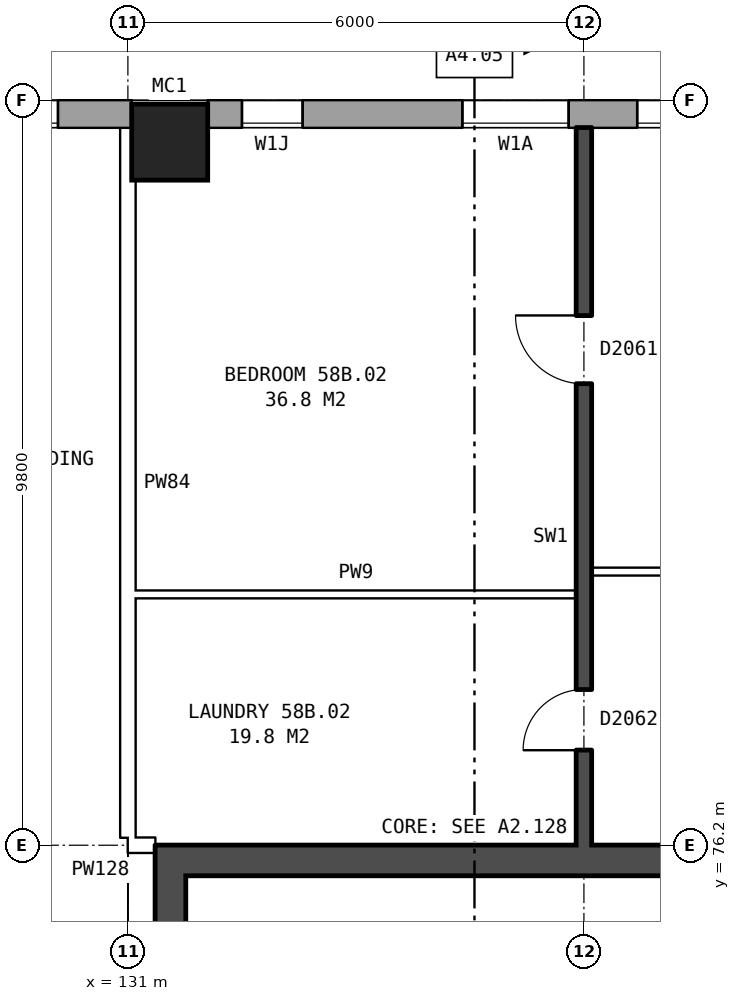
"""IFC4 building model, lengths in metres.
Left out: names, types, materials, properties, quantities, classifications, styles, units other than length and angle.
Written with IfcOpenShell. Run it as: python <this file> out.ifc"""

import sys

from ifc_helpers import new_model, si_unit, direction, frame, frame_2d, origin, origin_2d, place, context, subcontext, project, spatial, rectangle, hollow_rectangle, extrude, element, fill, save


model = new_model("IFC4")
c1 = context("Model", 3, precision=1e-05, world=origin(), true_north=direction((0.0, 1.0)))
c2 = subcontext(c1, "Body", "Model", "MODEL_VIEW")
j1 = project(units=[si_unit("LENGTHUNIT", "METRE"), si_unit("PLANEANGLEUNIT", "RADIAN")], contexts=[c1])
p1 = place(None, origin())
s1 = spatial("IfcSite", under=j1, at=p1, CompositionType="ELEMENT")
p2 = place(p1, origin())
s2 = spatial("IfcBuilding", under=s1, at=p2, CompositionType="ELEMENT")
p3 = place(p2, frame((0.0, 0.0, 205.9)))
s3 = spatial("IfcBuildingStorey", under=s2, at=p3, CompositionType="ELEMENT", Elevation=205.9)
p4 = place(p3, frame((131.55, 85.45, 0.0), z_axis=(0.0, 0.0, 1.0), x_axis=(1.0, 0.0, 0.0)))
e1 = element("IfcColumn", 1, at=p4, inside=s3, PredefinedType="COLUMN", context=c2, shape_type="SweptSolid", body=[
    extrude(hollow_rectangle(XDim=1.0, YDim=1.0, WallThickness=0.055, at=origin_2d()), origin(), (0.0, 0.0, 1.0), 3.1),
])
p5 = place(p3, frame((165.925, 85.82, 0.0), z_axis=(0.0, 0.0, 1.0), x_axis=(-1.0, 0.0, 0.0)))
e2 = element("IfcWall", 2, at=p5, inside=s3, PredefinedType="STANDARD", context=c2, shape_type="SweptSolid", body=[
    extrude(rectangle(XDim=33.875, YDim=0.36, at=frame_2d((16.938, 0.0))), origin(), (0.0, 0.0, 1.0), 2.85),
])
p6 = place(p5, frame((2.625, 0.0, 0.8)))
e3 = element("IfcOpeningElement", 3, at=p6, cuts=e2, PredefinedType="OPENING", context=c2, shape_type="SweptSolid", body=[
    extrude(rectangle(XDim=1.6, YDim=1.8, at=frame_2d((0.8, 0.9))), frame((0.0, 0.19, 0.0), z_axis=(0.0, -1.0, 0.0), x_axis=(1.0, 0.0, 0.0)), (0.0, 0.0, 1.0), 0.38),
])
p7 = place(p5, frame((5.625, 0.0, 0.8)))
e4 = element("IfcOpeningElement", 4, at=p7, cuts=e2, PredefinedType="OPENING", context=c2, shape_type="SweptSolid", body=[
    extrude(rectangle(XDim=1.6, YDim=1.8, at=frame_2d((0.8, 0.9))), frame((0.0, 0.19, 0.0), z_axis=(0.0, -1.0, 0.0), x_axis=(1.0, 0.0, 0.0)), (0.0, 0.0, 1.0), 0.38),
])
p8 = place(p5, frame((8.625, 0.0, 0.8)))
e5 = element("IfcOpeningElement", 5, at=p8, cuts=e2, PredefinedType="OPENING", context=c2, shape_type="SweptSolid", body=[
    extrude(rectangle(XDim=1.6, YDim=1.8, at=frame_2d((0.8, 0.9))), frame((0.0, 0.19, 0.0), z_axis=(0.0, -1.0, 0.0), x_axis=(1.0, 0.0, 0.0)), (0.0, 0.0, 1.0), 0.38),
])
p9 = place(p5, frame((11.625, 0.0, 0.8)))
e6 = element("IfcOpeningElement", 6, at=p9, cuts=e2, PredefinedType="OPENING", context=c2, shape_type="SweptSolid", body=[
    extrude(rectangle(XDim=1.6, YDim=1.8, at=frame_2d((0.8, 0.9))), frame((0.0, 0.19, 0.0), z_axis=(0.0, -1.0, 0.0), x_axis=(1.0, 0.0, 0.0)), (0.0, 0.0, 1.0), 0.38),
])
p10 = place(p5, frame((14.625, 0.0, 0.8)))
e7 = element("IfcOpeningElement", 7, at=p10, cuts=e2, PredefinedType="OPENING", context=c2, shape_type="SweptSolid", body=[
    extrude(rectangle(XDim=1.6, YDim=1.8, at=frame_2d((0.8, 0.9))), frame((0.0, 0.19, 0.0), z_axis=(0.0, -1.0, 0.0), x_axis=(1.0, 0.0, 0.0)), (0.0, 0.0, 1.0), 0.38),
])
p11 = place(p5, frame((17.625, 0.0, 0.8)))
e8 = element("IfcOpeningElement", 8, at=p11, cuts=e2, PredefinedType="OPENING", context=c2, shape_type="SweptSolid", body=[
    extrude(rectangle(XDim=1.6, YDim=1.8, at=frame_2d((0.8, 0.9))), frame((0.0, 0.19, 0.0), z_axis=(0.0, -1.0, 0.0), x_axis=(1.0, 0.0, 0.0)), (0.0, 0.0, 1.0), 0.38),
])
p12 = place(p5, frame((20.625, 0.0, 0.8)))
e9 = element("IfcOpeningElement", 9, at=p12, cuts=e2, PredefinedType="OPENING", context=c2, shape_type="SweptSolid", body=[
    extrude(rectangle(XDim=1.6, YDim=1.8, at=frame_2d((0.8, 0.9))), frame((0.0, 0.19, 0.0), z_axis=(0.0, -1.0, 0.0), x_axis=(1.0, 0.0, 0.0)), (0.0, 0.0, 1.0), 0.38),
])
p13 = place(p5, frame((23.625, 0.0, 0.8)))
e10 = element("IfcOpeningElement", 10, at=p13, cuts=e2, PredefinedType="OPENING", context=c2, shape_type="SweptSolid", body=[
    extrude(rectangle(XDim=1.6, YDim=1.8, at=frame_2d((0.8, 0.9))), frame((0.0, 0.19, 0.0), z_axis=(0.0, -1.0, 0.0), x_axis=(1.0, 0.0, 0.0)), (0.0, 0.0, 1.0), 0.38),
])
p14 = place(p5, frame((26.625, 0.0, 0.8)))
e11 = element("IfcOpeningElement", 11, at=p14, cuts=e2, PredefinedType="OPENING", context=c2, shape_type="SweptSolid", body=[
    extrude(rectangle(XDim=1.6, YDim=1.8, at=frame_2d((0.8, 0.9))), frame((0.0, 0.19, 0.0), z_axis=(0.0, -1.0, 0.0), x_axis=(1.0, 0.0, 0.0)), (0.0, 0.0, 1.0), 0.38),
])
p15 = place(p5, frame((29.125, 0.0, 0.8)))
e12 = element("IfcOpeningElement", 12, at=p15, cuts=e2, PredefinedType="OPENING", context=c2, shape_type="SweptSolid", body=[
    extrude(rectangle(XDim=1.4, YDim=1.8, at=frame_2d((0.7, 0.9))), frame((0.0, 0.19, 0.0), z_axis=(0.0, -1.0, 0.0), x_axis=(1.0, 0.0, 0.0)), (0.0, 0.0, 1.0), 0.38),
])
p16 = place(p5, frame((32.625, 0.0, 1.1)))
e13 = element("IfcOpeningElement", 13, at=p16, cuts=e2, PredefinedType="OPENING", context=c2, shape_type="SweptSolid", body=[
    extrude(rectangle(XDim=0.8, YDim=1.5, at=frame_2d((0.4, 0.75))), frame((0.0, 0.19, 0.0), z_axis=(0.0, -1.0, 0.0), x_axis=(1.0, 0.0, 0.0)), (0.0, 0.0, 1.0), 0.38),
])
p17 = place(p3, frame((131.05, 85.82, 0.0), z_axis=(0.0, 0.0, 1.0), x_axis=(-1.0, 0.0, 0.0)))
e14 = element("IfcWall", 14, at=p17, inside=s3, PredefinedType="STANDARD", context=c2, shape_type="SweptSolid", body=[
    extrude(rectangle(XDim=55.1, YDim=0.36, at=frame_2d((27.55, 0.0))), origin(), (0.0, 0.0, 1.0), 2.85),
])
p18 = place(p17, frame((0.969, 0.0, 0.8)))
e15 = element("IfcOpeningElement", 15, at=p18, cuts=e14, PredefinedType="OPENING", context=c2, shape_type="SweptSolid", body=[
    extrude(rectangle(XDim=1.6, YDim=1.8, at=frame_2d((0.8, 0.9))), frame((0.0, 0.19, 0.0), z_axis=(0.0, -1.0, 0.0), x_axis=(1.0, 0.0, 0.0)), (0.0, 0.0, 1.0), 0.38),
])
p19 = place(p17, frame((4.406, 0.0, 0.8)))
e16 = element("IfcOpeningElement", 16, at=p19, cuts=e14, PredefinedType="OPENING", context=c2, shape_type="SweptSolid", body=[
    extrude(rectangle(XDim=1.6, YDim=1.8, at=frame_2d((0.8, 0.9))), frame((0.0, 0.19, 0.0), z_axis=(0.0, -1.0, 0.0), x_axis=(1.0, 0.0, 0.0)), (0.0, 0.0, 1.0), 0.38),
])
p20 = place(p17, frame((7.844, 0.0, 0.8)))
e17 = element("IfcOpeningElement", 17, at=p20, cuts=e14, PredefinedType="OPENING", context=c2, shape_type="SweptSolid", body=[
    extrude(rectangle(XDim=1.6, YDim=1.8, at=frame_2d((0.8, 0.9))), frame((0.0, 0.19, 0.0), z_axis=(0.0, -1.0, 0.0), x_axis=(1.0, 0.0, 0.0)), (0.0, 0.0, 1.0), 0.38),
])
p21 = place(p17, frame((11.281, 0.0, 0.8)))
e18 = element("IfcOpeningElement", 18, at=p21, cuts=e14, PredefinedType="OPENING", context=c2, shape_type="SweptSolid", body=[
    extrude(rectangle(XDim=1.6, YDim=1.8, at=frame_2d((0.8, 0.9))), frame((0.0, 0.19, 0.0), z_axis=(0.0, -1.0, 0.0), x_axis=(1.0, 0.0, 0.0)), (0.0, 0.0, 1.0), 0.38),
])
p22 = place(p17, frame((14.719, 0.0, 0.8)))
e19 = element("IfcOpeningElement", 19, at=p22, cuts=e14, PredefinedType="OPENING", context=c2, shape_type="SweptSolid", body=[
    extrude(rectangle(XDim=1.6, YDim=1.8, at=frame_2d((0.8, 0.9))), frame((0.0, 0.19, 0.0), z_axis=(0.0, -1.0, 0.0), x_axis=(1.0, 0.0, 0.0)), (0.0, 0.0, 1.0), 0.38),
])
p23 = place(p17, frame((18.156, 0.0, 0.8)))
e20 = element("IfcOpeningElement", 20, at=p23, cuts=e14, PredefinedType="OPENING", context=c2, shape_type="SweptSolid", body=[
    extrude(rectangle(XDim=1.6, YDim=1.8, at=frame_2d((0.8, 0.9))), frame((0.0, 0.19, 0.0), z_axis=(0.0, -1.0, 0.0), x_axis=(1.0, 0.0, 0.0)), (0.0, 0.0, 1.0), 0.38),
])
p24 = place(p17, frame((21.594, 0.0, 0.8)))
e21 = element("IfcOpeningElement", 21, at=p24, cuts=e14, PredefinedType="OPENING", context=c2, shape_type="SweptSolid", body=[
    extrude(rectangle(XDim=1.6, YDim=1.8, at=frame_2d((0.8, 0.9))), frame((0.0, 0.19, 0.0), z_axis=(0.0, -1.0, 0.0), x_axis=(1.0, 0.0, 0.0)), (0.0, 0.0, 1.0), 0.38),
])
p25 = place(p17, frame((25.031, 0.0, 0.8)))
e22 = element("IfcOpeningElement", 22, at=p25, cuts=e14, PredefinedType="OPENING", context=c2, shape_type="SweptSolid", body=[
    extrude(rectangle(XDim=1.6, YDim=1.8, at=frame_2d((0.8, 0.9))), frame((0.0, 0.19, 0.0), z_axis=(0.0, -1.0, 0.0), x_axis=(1.0, 0.0, 0.0)), (0.0, 0.0, 1.0), 0.38),
])
p26 = place(p17, frame((28.469, 0.0, 0.8)))
e23 = element("IfcOpeningElement", 23, at=p26, cuts=e14, PredefinedType="OPENING", context=c2, shape_type="SweptSolid", body=[
    extrude(rectangle(XDim=1.6, YDim=1.8, at=frame_2d((0.8, 0.9))), frame((0.0, 0.19, 0.0), z_axis=(0.0, -1.0, 0.0), x_axis=(1.0, 0.0, 0.0)), (0.0, 0.0, 1.0), 0.38),
])
p27 = place(p17, frame((31.906, 0.0, 0.8)))
e24 = element("IfcOpeningElement", 24, at=p27, cuts=e14, PredefinedType="OPENING", context=c2, shape_type="SweptSolid", body=[
    extrude(rectangle(XDim=1.6, YDim=1.8, at=frame_2d((0.8, 0.9))), frame((0.0, 0.19, 0.0), z_axis=(0.0, -1.0, 0.0), x_axis=(1.0, 0.0, 0.0)), (0.0, 0.0, 1.0), 0.38),
])
p28 = place(p17, frame((35.344, 0.0, 0.8)))
e25 = element("IfcOpeningElement", 25, at=p28, cuts=e14, PredefinedType="OPENING", context=c2, shape_type="SweptSolid", body=[
    extrude(rectangle(XDim=1.6, YDim=1.8, at=frame_2d((0.8, 0.9))), frame((0.0, 0.19, 0.0), z_axis=(0.0, -1.0, 0.0), x_axis=(1.0, 0.0, 0.0)), (0.0, 0.0, 1.0), 0.38),
])
p29 = place(p17, frame((38.781, 0.0, 0.8)))
e26 = element("IfcOpeningElement", 26, at=p29, cuts=e14, PredefinedType="OPENING", context=c2, shape_type="SweptSolid", body=[
    extrude(rectangle(XDim=1.6, YDim=1.8, at=frame_2d((0.8, 0.9))), frame((0.0, 0.19, 0.0), z_axis=(0.0, -1.0, 0.0), x_axis=(1.0, 0.0, 0.0)), (0.0, 0.0, 1.0), 0.38),
])
p30 = place(p17, frame((42.219, 0.0, 0.8)))
e27 = element("IfcOpeningElement", 27, at=p30, cuts=e14, PredefinedType="OPENING", context=c2, shape_type="SweptSolid", body=[
    extrude(rectangle(XDim=1.6, YDim=1.8, at=frame_2d((0.8, 0.9))), frame((0.0, 0.19, 0.0), z_axis=(0.0, -1.0, 0.0), x_axis=(1.0, 0.0, 0.0)), (0.0, 0.0, 1.0), 0.38),
])
p31 = place(p17, frame((45.656, 0.0, 0.8)))
e28 = element("IfcOpeningElement", 28, at=p31, cuts=e14, PredefinedType="OPENING", context=c2, shape_type="SweptSolid", body=[
    extrude(rectangle(XDim=1.6, YDim=1.8, at=frame_2d((0.8, 0.9))), frame((0.0, 0.19, 0.0), z_axis=(0.0, -1.0, 0.0), x_axis=(1.0, 0.0, 0.0)), (0.0, 0.0, 1.0), 0.38),
])
p32 = place(p17, frame((49.094, 0.0, 0.8)))
e29 = element("IfcOpeningElement", 29, at=p32, cuts=e14, PredefinedType="OPENING", context=c2, shape_type="SweptSolid", body=[
    extrude(rectangle(XDim=1.6, YDim=1.8, at=frame_2d((0.8, 0.9))), frame((0.0, 0.19, 0.0), z_axis=(0.0, -1.0, 0.0), x_axis=(1.0, 0.0, 0.0)), (0.0, 0.0, 1.0), 0.38),
])
p33 = place(p17, frame((52.531, 0.0, 0.8)))
e30 = element("IfcOpeningElement", 30, at=p33, cuts=e14, PredefinedType="OPENING", context=c2, shape_type="SweptSolid", body=[
    extrude(rectangle(XDim=1.6, YDim=1.8, at=frame_2d((0.8, 0.9))), frame((0.0, 0.19, 0.0), z_axis=(0.0, -1.0, 0.0), x_axis=(1.0, 0.0, 0.0)), (0.0, 0.0, 1.0), 0.38),
])
p34 = place(p3, frame((131.56, 63.8, 0.0), z_axis=(0.0, 0.0, 1.0), x_axis=(0.0, 1.0, 0.0)))
e31 = element("IfcWall", 31, at=p34, inside=s3, PredefinedType="SHEAR", context=c2, shape_type="SweptSolid", body=[
    extrude(rectangle(XDim=12.4, YDim=0.4, at=frame_2d((6.2, 0.0))), origin(), (0.0, 0.0, 1.0), 2.85),
])
p35 = place(p34, frame((9.8, 0.0, 0.0)))
e32 = element("IfcOpeningElement", 32, at=p35, cuts=e31, PredefinedType="OPENING", context=c2, shape_type="SweptSolid", body=[
    extrude(rectangle(XDim=1.1, YDim=2.1, at=frame_2d((0.55, 1.05))), frame((0.0, 0.21, 0.0), z_axis=(0.0, -1.0, 0.0), x_axis=(1.0, 0.0, 0.0)), (0.0, 0.0, 1.0), 0.42),
])
p36 = place(p3, frame((139.36, 76.0, 0.0), z_axis=(0.0, 0.0, 1.0), x_axis=(-1.0, 0.0, 0.0)))
e33 = element("IfcWall", 33, at=p36, inside=s3, PredefinedType="SHEAR", context=c2, shape_type="SweptSolid", body=[
    extrude(rectangle(XDim=7.6, YDim=0.4, at=frame_2d((3.8, 0.0))), origin(), (0.0, 0.0, 1.0), 2.85),
])
p37 = place(p3, frame((131.0, 76.2, 0.0), z_axis=(0.0, 0.0, 1.0), x_axis=(1.0, 0.0, 0.0)))
e34 = element("IfcWall", 34, at=p37, inside=s3, PredefinedType="PARTITIONING", context=c2, shape_type="SweptSolid", body=[
    extrude(rectangle(XDim=0.36, YDim=0.2, at=frame_2d((0.18, 0.0))), origin(), (0.0, 0.0, 1.0), 2.85),
])
p38 = place(p3, frame((131.1, 79.5, 0.0), z_axis=(0.0, 0.0, 1.0), x_axis=(1.0, 0.0, 0.0)))
e35 = element("IfcWall", 35, at=p38, inside=s3, PredefinedType="PARTITIONING", context=c2, shape_type="SweptSolid", body=[
    extrude(rectangle(XDim=5.8, YDim=0.1, at=frame_2d((2.9, 0.0))), origin(), (0.0, 0.0, 1.0), 2.85),
])
p39 = place(p3, frame((137.1, 79.8, 0.0), z_axis=(0.0, 0.0, 1.0), x_axis=(1.0, 0.0, 0.0)))
e36 = element("IfcWall", 36, at=p39, inside=s3, PredefinedType="PARTITIONING", context=c2, shape_type="SweptSolid", body=[
    extrude(rectangle(XDim=5.8, YDim=0.1, at=frame_2d((2.9, 0.0))), origin(), (0.0, 0.0, 1.0), 2.85),
])
p40 = place(p39, frame((1.3, 0.0, 0.0)))
e37 = element("IfcOpeningElement", 37, at=p40, cuts=e36, PredefinedType="OPENING", context=c2, shape_type="SweptSolid", body=[
    extrude(rectangle(XDim=0.9, YDim=2.1, at=frame_2d((0.45, 1.05))), frame((0.0, 0.06, 0.0), z_axis=(0.0, -1.0, 0.0), x_axis=(1.0, 0.0, 0.0)), (0.0, 0.0, 1.0), 0.12),
])
p41 = place(p39, frame((4.2, 0.0, 0.0)))
e38 = element("IfcOpeningElement", 38, at=p41, cuts=e36, PredefinedType="OPENING", context=c2, shape_type="SweptSolid", body=[
    extrude(rectangle(XDim=0.9, YDim=2.1, at=frame_2d((0.45, 1.05))), frame((0.0, 0.06, 0.0), z_axis=(0.0, -1.0, 0.0), x_axis=(1.0, 0.0, 0.0)), (0.0, 0.0, 1.0), 0.12),
])
p42 = place(p3, frame((131.0, 76.3, 0.0), z_axis=(0.0, 0.0, 1.0), x_axis=(0.0, 1.0, 0.0)))
e39 = element("IfcWall", 39, at=p42, inside=s3, PredefinedType="PARTITIONING", context=c2, shape_type="SweptSolid", body=[
    extrude(rectangle(XDim=9.34, YDim=0.2, at=frame_2d((4.67, 0.0))), origin(), (0.0, 0.0, 1.0), 2.85),
])
p43 = place(p3, frame((137.0, 76.2, 0.0), z_axis=(0.0, 0.0, 1.0), x_axis=(0.0, 1.0, 0.0)))
e40 = element("IfcWall", 40, at=p43, inside=s3, PredefinedType="SOLIDWALL", context=c2, shape_type="SweptSolid", body=[
    extrude(rectangle(XDim=9.44, YDim=0.2, at=frame_2d((4.72, 0.0))), origin(), (0.0, 0.0, 1.0), 2.85),
])
p44 = place(p43, frame((6.07, 0.0, 0.0)))
e41 = element("IfcOpeningElement", 41, at=p44, cuts=e40, PredefinedType="OPENING", context=c2, shape_type="SweptSolid", body=[
    extrude(rectangle(XDim=0.9, YDim=2.1, at=frame_2d((0.45, 1.05))), frame((0.0, 0.11, 0.0), z_axis=(0.0, -1.0, 0.0), x_axis=(1.0, 0.0, 0.0)), (0.0, 0.0, 1.0), 0.22),
])
p45 = place(p43, frame((1.25, 0.0, 0.0)))
e42 = element("IfcOpeningElement", 42, at=p45, cuts=e40, PredefinedType="OPENING", context=c2, shape_type="SweptSolid", body=[
    extrude(rectangle(XDim=0.8, YDim=2.1, at=frame_2d((0.4, 1.05))), frame((0.0, 0.11, 0.0), z_axis=(0.0, -1.0, 0.0), x_axis=(1.0, 0.0, 0.0)), (0.0, 0.0, 1.0), 0.22),
])
p46 = place(p14, origin())
e43 = element("IfcWindow", 43, at=p46, inside=s3, PartitioningType="SINGLE_PANEL", PredefinedType="WINDOW", context=c2, shape_type="SweptSolid", body=[
    extrude(rectangle(XDim=1.6, YDim=1.8, at=frame_2d((0.8, 0.9))), frame((0.0, 0.15, 0.0), z_axis=(0.0, -1.0, 0.0), x_axis=(1.0, 0.0, 0.0)), (0.0, 0.0, 1.0), 0.06),
])
fill(e11, e43)
p47 = place(p15, origin())
e44 = element("IfcWindow", 44, at=p47, inside=s3, PartitioningType="SINGLE_PANEL", PredefinedType="WINDOW", context=c2, shape_type="SweptSolid", body=[
    extrude(rectangle(XDim=1.4, YDim=1.8, at=frame_2d((0.7, 0.9))), frame((0.0, 0.15, 0.0), z_axis=(0.0, -1.0, 0.0), x_axis=(1.0, 0.0, 0.0)), (0.0, 0.0, 1.0), 0.06),
])
fill(e12, e44)
p48 = place(p18, origin())
e45 = element("IfcWindow", 45, at=p48, inside=s3, PartitioningType="SINGLE_PANEL", PredefinedType="WINDOW", context=c2, shape_type="SweptSolid", body=[
    extrude(rectangle(XDim=1.6, YDim=1.8, at=frame_2d((0.8, 0.9))), frame((0.0, 0.15, 0.0), z_axis=(0.0, -1.0, 0.0), x_axis=(1.0, 0.0, 0.0)), (0.0, 0.0, 1.0), 0.06),
])
fill(e15, e45)
p49 = place(p44, origin())
e46 = element("IfcDoor", 46, at=p49, inside=s3, OperationType="SINGLE_SWING_RIGHT", PredefinedType="DOOR", context=c2, shape_type="SweptSolid", body=[
    extrude(rectangle(XDim=0.9, YDim=2.1, at=frame_2d((0.45, 1.05))), frame((0.0, 0.025, 0.0), z_axis=(0.0, -1.0, 0.0), x_axis=(1.0, 0.0, 0.0)), (0.0, 0.0, 1.0), 0.05),
])
fill(e41, e46)
p50 = place(p45, origin())
e47 = element("IfcDoor", 47, at=p50, inside=s3, OperationType="SINGLE_SWING_LEFT", PredefinedType="DOOR", context=c2, shape_type="SweptSolid", body=[
    extrude(rectangle(XDim=0.8, YDim=2.1, at=frame_2d((0.4, 1.05))), frame((0.0, 0.025, 0.0), z_axis=(0.0, -1.0, 0.0), x_axis=(1.0, 0.0, 0.0)), (0.0, 0.0, 1.0), 0.05),
])
fill(e42, e47)
p51 = place(p16, origin())
e48 = element("IfcWindow", 48, at=p51, inside=s3, PartitioningType="SINGLE_PANEL", PredefinedType="WINDOW", context=c2, shape_type="SweptSolid", body=[
    extrude(rectangle(XDim=0.8, YDim=1.5, at=frame_2d((0.4, 0.75))), frame((0.0, 0.15, 0.0), z_axis=(0.0, -1.0, 0.0), x_axis=(1.0, 0.0, 0.0)), (0.0, 0.0, 1.0), 0.06),
])
fill(e13, e48)
save(model, sys.argv[1])
